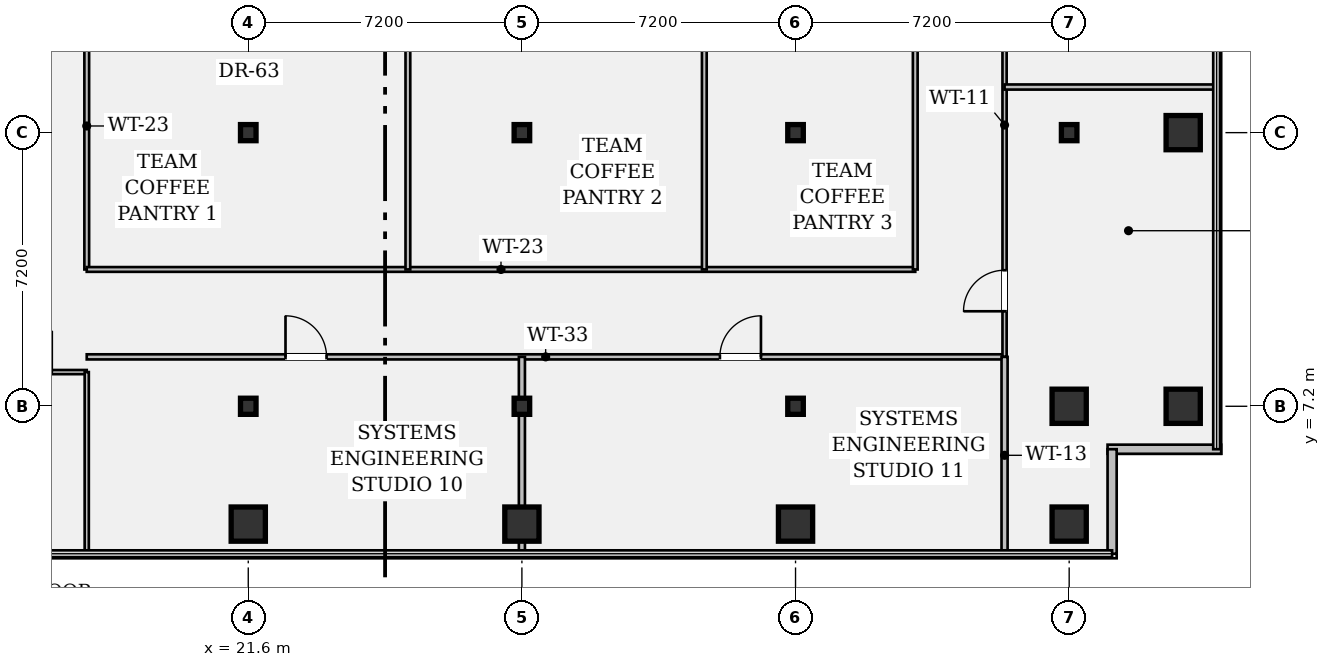
"""IFC4 building model, lengths in metres.
Left out: names, types, materials, properties, quantities, classifications, styles, units other than length and angle.
Written with IfcOpenShell. Run it as: python <this file> out.ifc"""

import sys

from ifc_helpers import new_model, si_unit, direction, frame, frame_2d, origin, origin_2d, place, context, subcontext, project, spatial, rectangle, hollow_rectangle, i_section, extrude, element, fill, save


model = new_model("IFC4")
c1 = context("Model", 3, precision=1e-05, world=origin(), true_north=direction((0.0, 1.0)))
c2 = subcontext(c1, "Body", "Model", "MODEL_VIEW")
j1 = project(units=[si_unit("LENGTHUNIT", "METRE"), si_unit("PLANEANGLEUNIT", "RADIAN")], contexts=[c1])
p1 = place(None, origin())
s1 = spatial("IfcSite", under=j1, at=p1, CompositionType="ELEMENT")
p2 = place(p1, origin())
s2 = spatial("IfcBuilding", under=s1, at=p2, CompositionType="ELEMENT")
p3 = place(p2, frame((0.0, 0.0, 117.6)))
s3 = spatial("IfcBuildingStorey", under=s2, at=p3, CompositionType="ELEMENT", Elevation=117.6)
p4 = place(p3, frame((21.6, 4.1, 0.0), z_axis=(0.0, 0.0, 1.0), x_axis=(1.0, 0.0, 0.0)))
e1 = element("IfcColumn", 1, at=p4, inside=s3, PredefinedType="COLUMN", context=c2, shape_type="SweptSolid", body=[
    extrude(hollow_rectangle(XDim=0.9, YDim=0.9, WallThickness=0.055, at=origin_2d()), origin(), (0.0, 0.0, 1.0), 3.58),
])
for number, where, z_axis, x_axis in (
    (2, (21.6, 7.2, 0.0), (0.0, 0.0, 1.0), (1.0, 0.0, 0.0)),
    (3, (21.6, 14.4, 0.0), (0.0, 0.0, 1.0), (1.0, 0.0, 0.0)),
):
    element("IfcColumn", number, at=place(p3, frame(where, z_axis=z_axis, x_axis=x_axis)), inside=s3, PredefinedType="COLUMN", context=c2, shape_type="SweptSolid", body=[
        extrude(i_section(OverallWidth=0.409, OverallDepth=0.424, WebThickness=0.033, FlangeThickness=0.052, FilletRadius=0.018, at=origin_2d()), origin(), (0.0, 0.0, 1.0), 3.58),
    ])
p5 = place(p3, frame((28.8, 4.1, 0.0), z_axis=(0.0, 0.0, 1.0), x_axis=(1.0, 0.0, 0.0)))
e4 = element("IfcColumn", 4, at=p5, inside=s3, PredefinedType="COLUMN", context=c2, shape_type="SweptSolid", body=[
    extrude(hollow_rectangle(XDim=0.9, YDim=0.9, WallThickness=0.055, at=origin_2d()), origin(), (0.0, 0.0, 1.0), 3.58),
])
for number, where, z_axis, x_axis in (
    (5, (28.8, 7.2, 0.0), (0.0, 0.0, 1.0), (1.0, 0.0, 0.0)),
    (6, (28.8, 14.4, 0.0), (0.0, 0.0, 1.0), (1.0, 0.0, 0.0)),
):
    element("IfcColumn", number, at=place(p3, frame(where, z_axis=z_axis, x_axis=x_axis)), inside=s3, PredefinedType="COLUMN", context=c2, shape_type="SweptSolid", body=[
        extrude(i_section(OverallWidth=0.409, OverallDepth=0.424, WebThickness=0.033, FlangeThickness=0.052, FilletRadius=0.018, at=origin_2d()), origin(), (0.0, 0.0, 1.0), 3.58),
    ])
p6 = place(p3, frame((36.0, 4.1, 0.0), z_axis=(0.0, 0.0, 1.0), x_axis=(1.0, 0.0, 0.0)))
e7 = element("IfcColumn", 7, at=p6, inside=s3, PredefinedType="COLUMN", context=c2, shape_type="SweptSolid", body=[
    extrude(hollow_rectangle(XDim=0.9, YDim=0.9, WallThickness=0.055, at=origin_2d()), origin(), (0.0, 0.0, 1.0), 3.58),
])
for number, where, z_axis, x_axis in (
    (8, (36.0, 7.2, 0.0), (0.0, 0.0, 1.0), (1.0, 0.0, 0.0)),
    (9, (36.0, 14.4, 0.0), (0.0, 0.0, 1.0), (1.0, 0.0, 0.0)),
):
    element("IfcColumn", number, at=place(p3, frame(where, z_axis=z_axis, x_axis=x_axis)), inside=s3, PredefinedType="COLUMN", context=c2, shape_type="SweptSolid", body=[
        extrude(i_section(OverallWidth=0.409, OverallDepth=0.424, WebThickness=0.033, FlangeThickness=0.052, FilletRadius=0.018, at=origin_2d()), origin(), (0.0, 0.0, 1.0), 3.58),
    ])
for number, where, z_axis, x_axis in (
    (10, (43.2, 4.1, 0.0), (0.0, 0.0, 1.0), (1.0, 0.0, 0.0)),
    (11, (43.2, 7.2, 0.0), (0.0, 0.0, 1.0), (1.0, 0.0, 0.0)),
):
    element("IfcColumn", number, at=place(p3, frame(where, z_axis=z_axis, x_axis=x_axis)), inside=s3, PredefinedType="COLUMN", context=c2, shape_type="SweptSolid", body=[
        extrude(hollow_rectangle(XDim=0.9, YDim=0.9, WallThickness=0.055, at=origin_2d()), origin(), (0.0, 0.0, 1.0), 3.58),
    ])
p7 = place(p3, frame((43.2, 14.4, 0.0), z_axis=(0.0, 0.0, 1.0), x_axis=(1.0, 0.0, 0.0)))
e12 = element("IfcColumn", 12, at=p7, inside=s3, PredefinedType="COLUMN", context=c2, shape_type="SweptSolid", body=[
    extrude(i_section(OverallWidth=0.409, OverallDepth=0.424, WebThickness=0.033, FlangeThickness=0.052, FilletRadius=0.018, at=origin_2d()), origin(), (0.0, 0.0, 1.0), 3.58),
])
for number, where, z_axis, x_axis in (
    (13, (46.2, 7.2, 0.0), (0.0, 0.0, 1.0), (1.0, 0.0, 0.0)),
    (14, (46.2, 14.4, 0.0), (0.0, 0.0, 1.0), (1.0, 0.0, 0.0)),
):
    element("IfcColumn", number, at=place(p3, frame(where, z_axis=z_axis, x_axis=x_axis)), inside=s3, PredefinedType="COLUMN", context=c2, shape_type="SweptSolid", body=[
        extrude(hollow_rectangle(XDim=0.9, YDim=0.9, WallThickness=0.055, at=origin_2d()), origin(), (0.0, 0.0, 1.0), 3.58),
    ])
p8 = place(p3, frame((47.2, 6.07, 0.0), z_axis=(0.0, 0.0, 1.0), x_axis=(-1.0, 0.0, 0.0)))
e15 = element("IfcWall", 15, at=p8, inside=s3, PredefinedType="STANDARD", context=c2, shape_type="SweptSolid", body=[
    extrude(rectangle(XDim=2.99, YDim=0.24, at=frame_2d((1.495, 0.0))), origin(), (0.0, 0.0, 1.0), 3.58),
])
p9 = place(p3, frame((44.33, 6.07, 0.0), z_axis=(0.0, 0.0, 1.0), x_axis=(0.0, -1.0, 0.0)))
e16 = element("IfcWall", 16, at=p9, inside=s3, PredefinedType="STANDARD", context=c2, shape_type="SweptSolid", body=[
    extrude(rectangle(XDim=2.75, YDim=0.24, at=frame_2d((1.375, 0.0))), origin(), (0.0, 0.0, 1.0), 3.58),
])
p10 = place(p3, frame((14.4, 8.1, 0.0), z_axis=(0.0, 0.0, 1.0), x_axis=(1.0, 0.0, 0.0)))
e17 = element("IfcWall", 17, at=p10, inside=s3, PredefinedType="PARTITIONING", context=c2, shape_type="SweptSolid", body=[
    extrude(rectangle(XDim=2.95, YDim=0.11, at=frame_2d((1.475, 0.0))), origin(), (0.0, 0.0, 1.0), 3.098),
])
p11 = place(p10, frame((0.95, 0.0, 0.0)))
e18 = element("IfcOpeningElement", 18, at=p11, cuts=e17, PredefinedType="OPENING", context=c2, shape_type="SweptSolid", body=[
    extrude(rectangle(XDim=1.08, YDim=2.15, at=frame_2d((0.54, 1.075))), frame((0.0, 0.067, 0.0), z_axis=(0.0, -1.0, 0.0), x_axis=(1.0, 0.0, 0.0)), (0.0, 0.0, 1.0), 0.134),
])
p12 = place(p3, frame((17.35, 8.5, 0.0), z_axis=(0.0, 0.0, 1.0), x_axis=(1.0, 0.0, 0.0)))
e19 = element("IfcWall", 19, at=p12, inside=s3, PredefinedType="PARTITIONING", context=c2, shape_type="SweptSolid", body=[
    extrude(rectangle(XDim=24.15, YDim=0.135, at=frame_2d((12.075, 0.0))), origin(), (0.0, 0.0, 1.0), 2.869),
])
p13 = place(p12, frame((5.23, 0.0, 0.0)))
e20 = element("IfcOpeningElement", 20, at=p13, cuts=e19, PredefinedType="OPENING", context=c2, shape_type="SweptSolid", body=[
    extrude(rectangle(XDim=1.08, YDim=2.15, at=frame_2d((0.54, 1.075))), frame((0.0, 0.08, 0.0), z_axis=(0.0, -1.0, 0.0), x_axis=(1.0, 0.0, 0.0)), (0.0, 0.0, 1.0), 0.159),
])
p14 = place(p12, frame((16.66, 0.0, 0.0)))
e21 = element("IfcOpeningElement", 21, at=p14, cuts=e19, PredefinedType="OPENING", context=c2, shape_type="SweptSolid", body=[
    extrude(rectangle(XDim=1.08, YDim=2.15, at=frame_2d((0.54, 1.075))), frame((0.0, 0.08, 0.0), z_axis=(0.0, -1.0, 0.0), x_axis=(1.0, 0.0, 0.0)), (0.0, 0.0, 1.0), 0.159),
])
p15 = place(p3, frame((41.5, 8.5, 0.0), z_axis=(0.0, 0.0, 1.0), x_axis=(0.0, 1.0, 0.0)))
e22 = element("IfcWall", 22, at=p15, inside=s3, PredefinedType="PARTITIONING", context=c2, shape_type="SweptSolid", body=[
    extrude(rectangle(XDim=12.2, YDim=0.11, at=frame_2d((6.1, 0.0))), origin(), (0.0, 0.0, 1.0), 2.869),
])
p16 = place(p15, frame((1.2, 0.0, 0.0)))
e23 = element("IfcOpeningElement", 23, at=p16, cuts=e22, PredefinedType="OPENING", context=c2, shape_type="SweptSolid", body=[
    extrude(rectangle(XDim=1.08, YDim=2.15, at=frame_2d((0.54, 1.075))), frame((0.0, 0.067, 0.0), z_axis=(0.0, -1.0, 0.0), x_axis=(1.0, 0.0, 0.0)), (0.0, 0.0, 1.0), 0.134),
])
p17 = place(p15, frame((10.2, 0.0, 0.0)))
e24 = element("IfcOpeningElement", 24, at=p17, cuts=e22, PredefinedType="OPENING", context=c2, shape_type="SweptSolid", body=[
    extrude(rectangle(XDim=1.08, YDim=2.15, at=frame_2d((0.54, 1.075))), frame((0.0, 0.067, 0.0), z_axis=(0.0, -1.0, 0.0), x_axis=(1.0, 0.0, 0.0)), (0.0, 0.0, 1.0), 0.134),
])
p18 = place(p3, frame((17.35, 10.8, 0.0), z_axis=(0.0, 0.0, 1.0), x_axis=(0.0, 1.0, 0.0)))
e25 = element("IfcWall", 25, at=p18, inside=s3, PredefinedType="PARTITIONING", context=c2, shape_type="SweptSolid", body=[
    extrude(rectangle(XDim=7.55, YDim=0.125, at=frame_2d((3.775, 0.0))), origin(), (0.0, 0.0, 1.0), 2.869),
])
p19 = place(p3, frame((17.35, 10.8, 0.0), z_axis=(0.0, 0.0, 1.0), x_axis=(1.0, 0.0, 0.0)))
e26 = element("IfcWall", 26, at=p19, inside=s3, PredefinedType="PARTITIONING", context=c2, shape_type="SweptSolid", body=[
    extrude(rectangle(XDim=21.8, YDim=0.125, at=frame_2d((10.9, 0.0))), origin(), (0.0, 0.0, 1.0), 2.869),
])
for number, where, z_axis, x_axis in (
    (27, (39.15, 10.8, 0.0), (0.0, 0.0, 1.0), (0.0, 1.0, 0.0)),
    (28, (25.8, 10.8, 0.0), (0.0, 0.0, 1.0), (0.0, 1.0, 0.0)),
    (29, (33.6, 10.8, 0.0), (0.0, 0.0, 1.0), (0.0, 1.0, 0.0)),
):
    element("IfcWall", number, at=place(p3, frame(where, z_axis=z_axis, x_axis=x_axis)), inside=s3, PredefinedType="PARTITIONING", context=c2, shape_type="SweptSolid", body=[
        extrude(rectangle(XDim=7.55, YDim=0.125, at=frame_2d((3.775, 0.0))), origin(), (0.0, 0.0, 1.0), 2.869),
    ])
p20 = place(p3, frame((41.5, 3.32, 0.0), z_axis=(0.0, 0.0, 1.0), x_axis=(0.0, 1.0, 0.0)))
e30 = element("IfcWall", 30, at=p20, inside=s3, PredefinedType="PARTITIONING", context=c2, shape_type="SweptSolid", body=[
    extrude(rectangle(XDim=5.18, YDim=0.16, at=frame_2d((2.59, 0.0))), origin(), (0.0, 0.0, 1.0), 2.869),
])
p21 = place(p3, frame((41.5, 15.6, 0.0), z_axis=(0.0, 0.0, 1.0), x_axis=(1.0, 0.0, 0.0)))
e31 = element("IfcWall", 31, at=p21, inside=s3, PredefinedType="PARTITIONING", context=c2, shape_type="SweptSolid", body=[
    extrude(rectangle(XDim=5.58, YDim=0.135, at=frame_2d((2.79, 0.0))), origin(), (0.0, 0.0, 1.0), 2.869),
])
p22 = place(p3, frame((17.35, 3.32, 0.0), z_axis=(0.0, 0.0, 1.0), x_axis=(0.0, 1.0, 0.0)))
e32 = element("IfcWall", 32, at=p22, inside=s3, PredefinedType="PARTITIONING", context=c2, shape_type="SweptSolid", body=[
    extrude(rectangle(XDim=4.78, YDim=0.11, at=frame_2d((2.39, 0.0))), origin(), (0.0, 0.0, 1.0), 2.869),
])
p23 = place(p3, frame((28.8, 3.32, 0.0), z_axis=(0.0, 0.0, 1.0), x_axis=(0.0, 1.0, 0.0)))
e33 = element("IfcWall", 33, at=p23, inside=s3, PredefinedType="PARTITIONING", context=c2, shape_type="SweptSolid", body=[
    extrude(rectangle(XDim=5.18, YDim=0.16, at=frame_2d((2.59, 0.0))), origin(), (0.0, 0.0, 1.0), 2.869),
])
p24 = place(p16, origin())
e34 = element("IfcDoor", 34, at=p24, inside=s3, OperationType="SINGLE_SWING_LEFT", PredefinedType="DOOR", context=c2, shape_type="SweptSolid", body=[
    extrude(rectangle(XDim=1.08, YDim=2.15, at=frame_2d((0.54, 1.075))), frame((0.0, 0.025, 0.0), z_axis=(0.0, -1.0, 0.0), x_axis=(1.0, 0.0, 0.0)), (0.0, 0.0, 1.0), 0.05),
])
fill(e23, e34)
p25 = place(p13, origin())
e35 = element("IfcDoor", 35, at=p25, inside=s3, OperationType="SINGLE_SWING_LEFT", PredefinedType="DOOR", context=c2, shape_type="SweptSolid", body=[
    extrude(rectangle(XDim=1.08, YDim=2.15, at=frame_2d((0.54, 1.075))), frame((0.0, 0.025, 0.0), z_axis=(0.0, -1.0, 0.0), x_axis=(1.0, 0.0, 0.0)), (0.0, 0.0, 1.0), 0.05),
])
fill(e20, e35)
p26 = place(p14, origin())
e36 = element("IfcDoor", 36, at=p26, inside=s3, OperationType="SINGLE_SWING_RIGHT", PredefinedType="DOOR", context=c2, shape_type="SweptSolid", body=[
    extrude(rectangle(XDim=1.08, YDim=2.15, at=frame_2d((0.54, 1.075))), frame((0.0, 0.025, 0.0), z_axis=(0.0, -1.0, 0.0), x_axis=(1.0, 0.0, 0.0)), (0.0, 0.0, 1.0), 0.05),
])
fill(e21, e36)
save(model, sys.argv[1])
